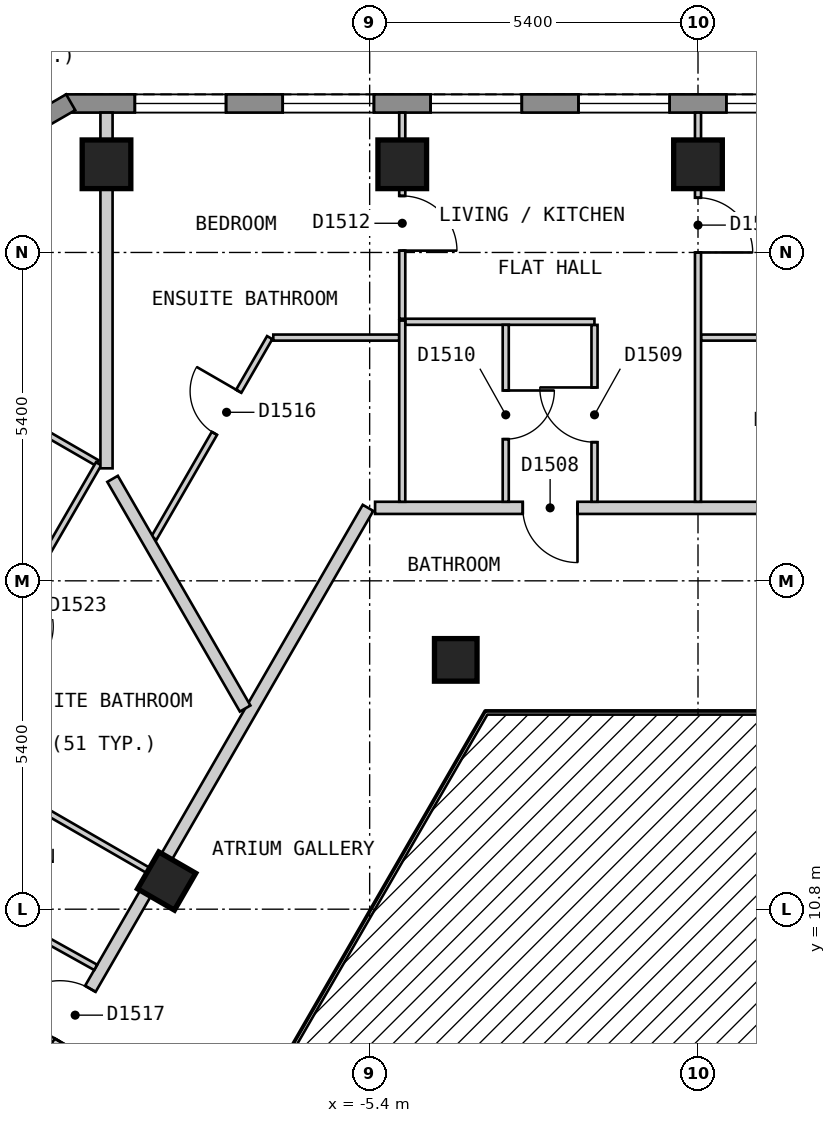
"""IFC4 building model, lengths in metres.
Left out: names, types, materials, properties, quantities, classifications, styles, units other than length and angle.
Written with IfcOpenShell. Run it as: python <this file> out.ifc"""

import sys

from ifc_helpers import new_model, si_unit, direction, frame, frame_2d, origin, origin_2d, place, context, subcontext, project, spatial, polyline, rectangle, outline, extrude, element, fill, save


model = new_model("IFC4")
c1 = context("Model", 3, precision=1e-05, world=origin(), true_north=direction((0.0, 1.0)))
c2 = subcontext(c1, "Body", "Model", "MODEL_VIEW")
j1 = project(units=[si_unit("LENGTHUNIT", "METRE"), si_unit("PLANEANGLEUNIT", "RADIAN")], contexts=[c1])
p1 = place(None, origin())
s1 = spatial("IfcSite", under=j1, at=p1, CompositionType="ELEMENT")
p2 = place(p1, origin())
s2 = spatial("IfcBuilding", under=s1, at=p2, CompositionType="ELEMENT")
p3 = place(p2, frame((0.0, 0.0, 190.2)))
s3 = spatial("IfcBuildingStorey", under=s2, at=p3, CompositionType="ELEMENT", Elevation=190.2)
for number, where, z_axis, x_axis in (
    (1, (0.0, 23.05, 0.0), (0.0, 0.0, 1.0), (-1.0, 0.0, 0.0)),
    (2, (-4.864, 23.05, 0.0), (0.0, 0.0, 1.0), (-1.0, 0.0, 0.0)),
    (3, (-9.728, 23.05, 0.0), (0.0, 0.0, 1.0), (-1.0, 0.0, 0.0)),
):
    element("IfcColumn", number, at=place(p3, frame(where, z_axis=z_axis, x_axis=x_axis)), inside=s3, PredefinedType="COLUMN", context=c2, shape_type="SweptSolid", body=[
        extrude(rectangle(XDim=0.8, YDim=0.8, at=origin_2d()), origin(), (0.0, 0.0, 1.0), 3.0),
    ])
for number, where, z_axis, x_axis in (
    (4, (-3.984, 14.9, 0.0), (0.0, 0.0, 1.0), (1.0, 0.0, 0.0)),
    (5, (-8.739, 11.263, 0.0), (0.0, 0.0, 1.0), (-0.5, -0.866, 0.0)),
):
    element("IfcColumn", number, at=place(p3, frame(where, z_axis=z_axis, x_axis=x_axis)), inside=s3, PredefinedType="COLUMN", context=c2, shape_type="SweptSolid", body=[
        extrude(rectangle(XDim=0.7, YDim=0.7, at=origin_2d()), origin(), (0.0, 0.0, 1.0), 3.0),
    ])
p4 = place(p3, frame((10.392, 24.05, 0.0), z_axis=(0.0, 0.0, 1.0), x_axis=(-1.0, 0.0, 0.0)))
e6 = element("IfcWall", 6, at=p4, inside=s3, PredefinedType="SOLIDWALL", context=c2, shape_type="SweptSolid", body=[
    extrude(outline(polyline([(0.0, -0.15), (20.784, -0.15), (20.704, 0.15), (0.08, 0.15), (0.0, -0.15)])), origin(), (0.0, 0.0, 1.0), 2.7),
])
p5 = place(p4, frame((1.13, 0.0, 0.15)))
e7 = element("IfcOpeningElement", 7, at=p5, cuts=e6, PredefinedType="OPENING", context=c2, shape_type="SweptSolid", body=[
    extrude(rectangle(XDim=1.5, YDim=2.1, at=frame_2d((0.75, 1.05))), frame((0.0, 0.16, 0.0), z_axis=(0.0, -1.0, 0.0), x_axis=(1.0, 0.0, 0.0)), (0.0, 0.0, 1.0), 0.32),
])
p6 = place(p4, frame((3.562, 0.0, 0.15)))
e8 = element("IfcOpeningElement", 8, at=p6, cuts=e6, PredefinedType="OPENING", context=c2, shape_type="SweptSolid", body=[
    extrude(rectangle(XDim=1.5, YDim=2.1, at=frame_2d((0.75, 1.05))), frame((0.0, 0.16, 0.0), z_axis=(0.0, -1.0, 0.0), x_axis=(1.0, 0.0, 0.0)), (0.0, 0.0, 1.0), 0.32),
])
p7 = place(p4, frame((5.994, 0.0, 0.15)))
e9 = element("IfcOpeningElement", 9, at=p7, cuts=e6, PredefinedType="OPENING", context=c2, shape_type="SweptSolid", body=[
    extrude(rectangle(XDim=1.5, YDim=2.1, at=frame_2d((0.75, 1.05))), frame((0.0, 0.16, 0.0), z_axis=(0.0, -1.0, 0.0), x_axis=(1.0, 0.0, 0.0)), (0.0, 0.0, 1.0), 0.32),
])
p8 = place(p4, frame((8.426, 0.0, 0.15)))
e10 = element("IfcOpeningElement", 10, at=p8, cuts=e6, PredefinedType="OPENING", context=c2, shape_type="SweptSolid", body=[
    extrude(rectangle(XDim=1.5, YDim=2.1, at=frame_2d((0.75, 1.05))), frame((0.0, 0.16, 0.0), z_axis=(0.0, -1.0, 0.0), x_axis=(1.0, 0.0, 0.0)), (0.0, 0.0, 1.0), 0.32),
])
p9 = place(p4, frame((10.858, 0.0, 0.15)))
e11 = element("IfcOpeningElement", 11, at=p9, cuts=e6, PredefinedType="OPENING", context=c2, shape_type="SweptSolid", body=[
    extrude(rectangle(XDim=1.5, YDim=2.1, at=frame_2d((0.75, 1.05))), frame((0.0, 0.16, 0.0), z_axis=(0.0, -1.0, 0.0), x_axis=(1.0, 0.0, 0.0)), (0.0, 0.0, 1.0), 0.32),
])
p10 = place(p4, frame((13.29, 0.0, 0.15)))
e12 = element("IfcOpeningElement", 12, at=p10, cuts=e6, PredefinedType="OPENING", context=c2, shape_type="SweptSolid", body=[
    extrude(rectangle(XDim=1.5, YDim=2.1, at=frame_2d((0.75, 1.05))), frame((0.0, 0.16, 0.0), z_axis=(0.0, -1.0, 0.0), x_axis=(1.0, 0.0, 0.0)), (0.0, 0.0, 1.0), 0.32),
])
p11 = place(p4, frame((15.722, 0.0, 0.15)))
e13 = element("IfcOpeningElement", 13, at=p11, cuts=e6, PredefinedType="OPENING", context=c2, shape_type="SweptSolid", body=[
    extrude(rectangle(XDim=1.5, YDim=2.1, at=frame_2d((0.75, 1.05))), frame((0.0, 0.16, 0.0), z_axis=(0.0, -1.0, 0.0), x_axis=(1.0, 0.0, 0.0)), (0.0, 0.0, 1.0), 0.32),
])
p12 = place(p4, frame((18.154, 0.0, 0.15)))
e14 = element("IfcOpeningElement", 14, at=p12, cuts=e6, PredefinedType="OPENING", context=c2, shape_type="SweptSolid", body=[
    extrude(rectangle(XDim=1.5, YDim=2.1, at=frame_2d((0.75, 1.05))), frame((0.0, 0.16, 0.0), z_axis=(0.0, -1.0, 0.0), x_axis=(1.0, 0.0, 0.0)), (0.0, 0.0, 1.0), 0.32),
])
p13 = place(p3, frame((-10.317, 24.07, 0.0), z_axis=(0.0, 0.0, 1.0), x_axis=(-0.866022959057, -0.500004234368, 0.0)))
e15 = element("IfcWall", 15, at=p13, inside=s3, PredefinedType="SOLIDWALL", context=c2, shape_type="SweptSolid", body=[
    extrude(outline(polyline([(0.0, -0.15), (5.0, -0.15), (4.92, 0.15), (0.08, 0.15), (0.0, -0.15)])), origin(), (0.0, 0.0, 1.0), 2.7),
])
p14 = place(p13, frame((0.65, 0.0, 0.15)))
e16 = element("IfcOpeningElement", 16, at=p14, cuts=e15, PredefinedType="OPENING", context=c2, shape_type="SweptSolid", body=[
    extrude(rectangle(XDim=1.2, YDim=2.1, at=frame_2d((0.6, 1.05))), frame((0.0, 0.16, 0.0), z_axis=(0.0, -1.0, 0.0), x_axis=(1.0, 0.0, 0.0)), (0.0, 0.0, 1.0), 0.32),
])
p15 = place(p13, frame((3.149, 0.0, 0.15)))
e17 = element("IfcOpeningElement", 17, at=p15, cuts=e15, PredefinedType="OPENING", context=c2, shape_type="SweptSolid", body=[
    extrude(rectangle(XDim=1.2, YDim=2.1, at=frame_2d((0.6, 1.05))), frame((0.0, 0.16, 0.0), z_axis=(0.0, -1.0, 0.0), x_axis=(1.0, 0.0, 0.0)), (0.0, 0.0, 1.0), 0.32),
])
p16 = place(p3, frame((-5.311, 17.4, 0.0), z_axis=(0.0, 0.0, 1.0), x_axis=(1.0, 0.0, 0.0)))
e18 = element("IfcWall", 18, at=p16, inside=s3, PredefinedType="PARTITIONING", context=c2, shape_type="SweptSolid", body=[
    extrude(rectangle(XDim=10.737, YDim=0.2, at=frame_2d((5.369, 0.0))), origin(), (0.0, 0.0, 1.0), 2.7),
])
p17 = place(p16, frame((2.429, 0.0, 0.0)))
e19 = element("IfcOpeningElement", 19, at=p17, cuts=e18, PredefinedType="OPENING", context=c2, shape_type="SweptSolid", body=[
    extrude(rectangle(XDim=0.9, YDim=2.1, at=frame_2d((0.45, 1.05))), frame((0.0, 0.11, 0.0), z_axis=(0.0, -1.0, 0.0), x_axis=(1.0, 0.0, 0.0)), (0.0, 0.0, 1.0), 0.22),
])
p18 = place(p3, frame((-10.854, 8.0, 0.0), z_axis=(0.0, 0.0, 1.0), x_axis=(0.499997637144, 0.866026767976, 0.0)))
e20 = element("IfcWall", 20, at=p18, inside=s3, PredefinedType="PARTITIONING", context=c2, shape_type="SweptSolid", body=[
    extrude(rectangle(XDim=10.854, YDim=0.2, at=frame_2d((5.427, 0.0))), origin(), (0.0, 0.0, 1.0), 2.7),
])
p19 = place(p18, frame((0.721, 0.0, 0.0)))
e21 = element("IfcOpeningElement", 21, at=p19, cuts=e20, PredefinedType="OPENING", context=c2, shape_type="SweptSolid", body=[
    extrude(rectangle(XDim=1.0, YDim=2.1, at=frame_2d((0.5, 1.05))), frame((0.0, 0.11, 0.0), z_axis=(0.0, -1.0, 0.0), x_axis=(1.0, 0.0, 0.0)), (0.0, 0.0, 1.0), 0.22),
])
p20 = place(p3, frame((-4.864, 23.9, 0.0), z_axis=(0.0, 0.0, 1.0), x_axis=(0.0, -1.0, 0.0)))
e22 = element("IfcWall", 22, at=p20, inside=s3, PredefinedType="PARTITIONING", context=c2, shape_type="SweptSolid", body=[
    extrude(rectangle(XDim=3.39, YDim=0.1, at=frame_2d((1.695, 0.0))), origin(), (0.0, 0.0, 1.0), 2.7),
])
p21 = place(p20, frame((1.37, 0.0, 0.0)))
e23 = element("IfcOpeningElement", 23, at=p21, cuts=e22, PredefinedType="OPENING", context=c2, shape_type="SweptSolid", body=[
    extrude(rectangle(XDim=0.9, YDim=2.1, at=frame_2d((0.45, 1.05))), frame((0.0, 0.06, 0.0), z_axis=(0.0, -1.0, 0.0), x_axis=(1.0, 0.0, 0.0)), (0.0, 0.0, 1.0), 0.12),
])
p22 = place(p3, frame((-1.702, 20.409, 0.0), z_axis=(0.0, 0.0, 1.0), x_axis=(0.0, -1.0, 0.0)))
e24 = element("IfcWall", 24, at=p22, inside=s3, PredefinedType="PARTITIONING", context=c2, shape_type="SweptSolid", body=[
    extrude(rectangle(XDim=2.909, YDim=0.1, at=frame_2d((1.455, 0.0))), origin(), (0.0, 0.0, 1.0), 2.7),
])
p23 = place(p22, frame((1.029, 0.0, 0.0)))
e25 = element("IfcOpeningElement", 25, at=p23, cuts=e24, PredefinedType="OPENING", context=c2, shape_type="SweptSolid", body=[
    extrude(rectangle(XDim=0.9, YDim=2.1, at=frame_2d((0.45, 1.05))), frame((0.0, 0.06, 0.0), z_axis=(0.0, -1.0, 0.0), x_axis=(1.0, 0.0, 0.0)), (0.0, 0.0, 1.0), 0.12),
])
p24 = place(p3, frame((-13.444, 11.814, 0.0), z_axis=(0.0, 0.0, 1.0), x_axis=(0.873653620945, -0.486548405207, 0.0)))
e26 = element("IfcWall", 26, at=p24, inside=s3, PredefinedType="PARTITIONING", context=c2, shape_type="SweptSolid", body=[
    extrude(rectangle(XDim=4.051, YDim=0.1, at=frame_2d((2.025, 0.0))), origin(), (0.0, 0.0, 1.0), 2.7),
])
p25 = place(p24, frame((1.6, 0.0, 0.0)))
e27 = element("IfcOpeningElement", 27, at=p25, cuts=e26, PredefinedType="OPENING", context=c2, shape_type="SweptSolid", body=[
    extrude(rectangle(XDim=0.9, YDim=2.1, at=frame_2d((0.45, 1.05))), frame((0.0, 0.06, 0.0), z_axis=(0.0, -1.0, 0.0), x_axis=(1.0, 0.0, 0.0)), (0.0, 0.0, 1.0), 0.12),
])
p26 = place(p3, frame((-14.794, 20.975, 0.0), z_axis=(0.0, 0.0, 1.0), x_axis=(0.865989811779, -0.500061642096, 0.0)))
e28 = element("IfcWall", 28, at=p26, inside=s3, PredefinedType="PARTITIONING", context=c2, shape_type="SweptSolid", body=[
    extrude(rectangle(XDim=5.67, YDim=0.1, at=frame_2d((2.835, 0.0))), origin(), (0.0, 0.0, 1.0), 2.7),
])
p27 = place(p26, frame((2.41, 0.0, 0.0)))
e29 = element("IfcOpeningElement", 29, at=p27, cuts=e28, PredefinedType="OPENING", context=c2, shape_type="SweptSolid", body=[
    extrude(rectangle(XDim=0.9, YDim=2.1, at=frame_2d((0.45, 1.05))), frame((0.0, 0.06, 0.0), z_axis=(0.0, -1.0, 0.0), x_axis=(1.0, 0.0, 0.0)), (0.0, 0.0, 1.0), 0.12),
])
p28 = place(p3, frame((-6.985, 20.2, 0.0), z_axis=(0.0, 0.0, 1.0), x_axis=(1.0, 0.0, 0.0)))
e30 = element("IfcWall", 30, at=p28, inside=s3, PredefinedType="PARTITIONING", context=c2, shape_type="SweptSolid", body=[
    extrude(rectangle(XDim=2.071, YDim=0.1, at=frame_2d((1.036, 0.0))), origin(), (0.0, 0.0, 1.0), 2.7),
])
p29 = place(p3, frame((0.05, 20.2, 0.0), z_axis=(0.0, 0.0, 1.0), x_axis=(1.0, 0.0, 0.0)))
e31 = element("IfcWall", 31, at=p29, inside=s3, PredefinedType="PARTITIONING", context=c2, shape_type="SweptSolid", body=[
    extrude(rectangle(XDim=6.993, YDim=0.1, at=frame_2d((3.497, 0.0))), origin(), (0.0, 0.0, 1.0), 2.7),
])
p30 = place(p29, frame((1.982, 0.0, 0.0)))
e32 = element("IfcOpeningElement", 32, at=p30, cuts=e31, PredefinedType="OPENING", context=c2, shape_type="SweptSolid", body=[
    extrude(rectangle(XDim=0.8, YDim=2.1, at=frame_2d((0.4, 1.05))), frame((0.0, 0.06, 0.0), z_axis=(0.0, -1.0, 0.0), x_axis=(1.0, 0.0, 0.0)), (0.0, 0.0, 1.0), 0.12),
])
p31 = place(p3, frame((-4.814, 20.46, 0.0), z_axis=(0.0, 0.0, 1.0), x_axis=(1.0, 0.0, 0.0)))
e33 = element("IfcWall", 33, at=p31, inside=s3, PredefinedType="PARTITIONING", context=c2, shape_type="SweptSolid", body=[
    extrude(rectangle(XDim=3.111, YDim=0.1, at=frame_2d((1.556, 0.0))), origin(), (0.0, 0.0, 1.0), 2.7),
])
p32 = place(p3, frame((-8.949, 16.9, 0.0), z_axis=(0.0, 0.0, 1.0), x_axis=(0.499949850951, 0.866054355415, 0.0)))
e34 = element("IfcWall", 34, at=p32, inside=s3, PredefinedType="PARTITIONING", context=c2, shape_type="SweptSolid", body=[
    extrude(rectangle(XDim=3.811, YDim=0.1, at=frame_2d((1.905, 0.0))), origin(), (0.0, 0.0, 1.0), 2.7),
])
p33 = place(p32, frame((1.992, 0.0, 0.0)))
e35 = element("IfcOpeningElement", 35, at=p33, cuts=e34, PredefinedType="OPENING", context=c2, shape_type="SweptSolid", body=[
    extrude(rectangle(XDim=0.8, YDim=2.1, at=frame_2d((0.4, 1.05))), frame((0.0, 0.06, 0.0), z_axis=(0.0, -1.0, 0.0), x_axis=(1.0, 0.0, 0.0)), (0.0, 0.0, 1.0), 0.12),
])
p34 = place(p3, frame((-15.192, 8.887, 0.0), z_axis=(0.0, 0.0, 1.0), x_axis=(0.500028204665, 0.866009119201, 0.0)))
e36 = element("IfcWall", 36, at=p34, inside=s3, PredefinedType="PARTITIONING", context=c2, shape_type="SweptSolid", body=[
    extrude(rectangle(XDim=10.667, YDim=0.1, at=frame_2d((5.334, 0.0))), origin(), (0.0, 0.0, 1.0), 2.7),
])
p35 = place(p34, frame((2.108, 0.0, 0.0)))
e37 = element("IfcOpeningElement", 37, at=p35, cuts=e36, PredefinedType="OPENING", context=c2, shape_type="SweptSolid", body=[
    extrude(rectangle(XDim=0.9, YDim=2.1, at=frame_2d((0.45, 1.05))), frame((0.0, 0.06, 0.0), z_axis=(0.0, -1.0, 0.0), x_axis=(1.0, 0.0, 0.0)), (0.0, 0.0, 1.0), 0.12),
])
p36 = place(p34, frame((7.576, 0.0, 0.0)))
e38 = element("IfcOpeningElement", 38, at=p36, cuts=e36, PredefinedType="OPENING", context=c2, shape_type="SweptSolid", body=[
    extrude(rectangle(XDim=0.8, YDim=2.1, at=frame_2d((0.4, 1.05))), frame((0.0, 0.06, 0.0), z_axis=(0.0, -1.0, 0.0), x_axis=(1.0, 0.0, 0.0)), (0.0, 0.0, 1.0), 0.12),
])
p37 = place(p3, frame((0.0, 17.5, 0.0), z_axis=(0.0, 0.0, 1.0), x_axis=(0.0, 1.0, 0.0)))
e39 = element("IfcWall", 39, at=p37, inside=s3, PredefinedType="PARTITIONING", context=c2, shape_type="SweptSolid", body=[
    extrude(rectangle(XDim=6.4, YDim=0.1, at=frame_2d((3.2, 0.0))), origin(), (0.0, 0.0, 1.0), 2.7),
])
p38 = place(p37, frame((4.1, 0.0, 0.0)))
e40 = element("IfcOpeningElement", 40, at=p38, cuts=e39, PredefinedType="OPENING", context=c2, shape_type="SweptSolid", body=[
    extrude(rectangle(XDim=0.9, YDim=2.1, at=frame_2d((0.45, 1.05))), frame((0.0, 0.06, 0.0), z_axis=(0.0, -1.0, 0.0), x_axis=(1.0, 0.0, 0.0)), (0.0, 0.0, 1.0), 0.12),
])
p39 = place(p3, frame((-3.162, 17.5, 0.0), z_axis=(0.0, 0.0, 1.0), x_axis=(0.0, 1.0, 0.0)))
e41 = element("IfcWall", 41, at=p39, inside=s3, PredefinedType="PARTITIONING", context=c2, shape_type="SweptSolid", body=[
    extrude(rectangle(XDim=2.91, YDim=0.1, at=frame_2d((1.455, 0.0))), origin(), (0.0, 0.0, 1.0), 2.7),
])
p40 = place(p39, frame((1.03, 0.0, 0.0)))
e42 = element("IfcOpeningElement", 42, at=p40, cuts=e41, PredefinedType="OPENING", context=c2, shape_type="SweptSolid", body=[
    extrude(rectangle(XDim=0.8, YDim=2.1, at=frame_2d((0.4, 1.05))), frame((0.0, 0.06, 0.0), z_axis=(0.0, -1.0, 0.0), x_axis=(1.0, 0.0, 0.0)), (0.0, 0.0, 1.0), 0.12),
])
p41 = place(p3, frame((-4.864, 17.5, 0.0), z_axis=(0.0, 0.0, 1.0), x_axis=(0.0, 1.0, 0.0)))
e43 = element("IfcWall", 43, at=p41, inside=s3, PredefinedType="PARTITIONING", context=c2, shape_type="SweptSolid", body=[
    extrude(rectangle(XDim=2.98, YDim=0.1, at=frame_2d((1.49, 0.0))), origin(), (0.0, 0.0, 1.0), 2.7),
])
p42 = place(p3, frame((-9.628, 17.877, 0.0), z_axis=(0.0, 0.0, 1.0), x_axis=(0.499890461358, -0.866088636713, 0.0)))
e44 = element("IfcWall", 44, at=p42, inside=s3, PredefinedType="PARTITIONING", context=c2, shape_type="SweptSolid", body=[
    extrude(rectangle(XDim=4.361, YDim=0.2, at=frame_2d((2.18, 0.0))), origin(), (0.0, 0.0, 1.0), 2.7),
])
p43 = place(p3, frame((-9.728, 18.05, 0.0), z_axis=(0.0, 0.0, 1.0), x_axis=(0.0, 1.0, 0.0)))
e45 = element("IfcWall", 45, at=p43, inside=s3, PredefinedType="PARTITIONING", context=c2, shape_type="SweptSolid", body=[
    extrude(rectangle(XDim=5.85, YDim=0.2, at=frame_2d((2.925, 0.0))), origin(), (0.0, 0.0, 1.0), 2.7),
])
p44 = place(p3, frame((-12.55, 13.463, 0.0), z_axis=(0.0, 0.0, 1.0), x_axis=(0.86606561423, -0.499930346997, 0.0)))
e46 = element("IfcWall", 46, at=p44, inside=s3, PredefinedType="PARTITIONING", context=c2, shape_type="SweptSolid", body=[
    extrude(rectangle(XDim=4.1, YDim=0.1, at=frame_2d((2.05, 0.0))), origin(), (0.0, 0.0, 1.0), 2.7),
])
p45 = place(p8, origin())
e47 = element("IfcWindow", 47, at=p45, inside=s3, PartitioningType="SINGLE_PANEL", PredefinedType="WINDOW", context=c2, shape_type="SweptSolid", body=[
    extrude(rectangle(XDim=1.5, YDim=2.1, at=frame_2d((0.75, 1.05))), frame((0.0, 0.03, 0.0), z_axis=(0.0, -1.0, 0.0), x_axis=(1.0, 0.0, 0.0)), (0.0, 0.0, 1.0), 0.06),
])
fill(e10, e47)
p46 = place(p9, origin())
e48 = element("IfcWindow", 48, at=p46, inside=s3, PartitioningType="SINGLE_PANEL", PredefinedType="WINDOW", context=c2, shape_type="SweptSolid", body=[
    extrude(rectangle(XDim=1.5, YDim=2.1, at=frame_2d((0.75, 1.05))), frame((0.0, 0.03, 0.0), z_axis=(0.0, -1.0, 0.0), x_axis=(1.0, 0.0, 0.0)), (0.0, 0.0, 1.0), 0.06),
])
fill(e11, e48)
p47 = place(p10, origin())
e49 = element("IfcWindow", 49, at=p47, inside=s3, PartitioningType="SINGLE_PANEL", PredefinedType="WINDOW", context=c2, shape_type="SweptSolid", body=[
    extrude(rectangle(XDim=1.5, YDim=2.1, at=frame_2d((0.75, 1.05))), frame((0.0, 0.03, 0.0), z_axis=(0.0, -1.0, 0.0), x_axis=(1.0, 0.0, 0.0)), (0.0, 0.0, 1.0), 0.06),
])
fill(e12, e49)
p48 = place(p11, origin())
e50 = element("IfcWindow", 50, at=p48, inside=s3, PartitioningType="SINGLE_PANEL", PredefinedType="WINDOW", context=c2, shape_type="SweptSolid", body=[
    extrude(rectangle(XDim=1.5, YDim=2.1, at=frame_2d((0.75, 1.05))), frame((0.0, 0.03, 0.0), z_axis=(0.0, -1.0, 0.0), x_axis=(1.0, 0.0, 0.0)), (0.0, 0.0, 1.0), 0.06),
])
fill(e13, e50)
p49 = place(p12, origin())
e51 = element("IfcWindow", 51, at=p49, inside=s3, PartitioningType="SINGLE_PANEL", PredefinedType="WINDOW", context=c2, shape_type="SweptSolid", body=[
    extrude(rectangle(XDim=1.5, YDim=2.1, at=frame_2d((0.75, 1.05))), frame((0.0, 0.03, 0.0), z_axis=(0.0, -1.0, 0.0), x_axis=(1.0, 0.0, 0.0)), (0.0, 0.0, 1.0), 0.06),
])
fill(e14, e51)
p50 = place(p17, origin())
e52 = element("IfcDoor", 52, at=p50, inside=s3, OperationType="SINGLE_SWING_RIGHT", PredefinedType="DOOR", context=c2, shape_type="SweptSolid", body=[
    extrude(rectangle(XDim=0.9, YDim=2.1, at=frame_2d((0.45, 1.05))), frame((0.0, 0.025, 0.0), z_axis=(0.0, -1.0, 0.0), x_axis=(1.0, 0.0, 0.0)), (0.0, 0.0, 1.0), 0.05),
])
fill(e19, e52)
p51 = place(p23, origin())
e53 = element("IfcDoor", 53, at=p51, inside=s3, OperationType="SINGLE_SWING_LEFT", PredefinedType="DOOR", context=c2, shape_type="SweptSolid", body=[
    extrude(rectangle(XDim=0.9, YDim=2.1, at=frame_2d((0.45, 1.05))), frame((0.0, 0.025, 0.0), z_axis=(0.0, -1.0, 0.0), x_axis=(1.0, 0.0, 0.0)), (0.0, 0.0, 1.0), 0.05),
])
fill(e25, e53)
p52 = place(p40, origin())
e54 = element("IfcDoor", 54, at=p52, inside=s3, OperationType="SINGLE_SWING_RIGHT", PredefinedType="DOOR", context=c2, shape_type="SweptSolid", body=[
    extrude(rectangle(XDim=0.8, YDim=2.1, at=frame_2d((0.4, 1.05))), frame((0.0, 0.025, 0.0), z_axis=(0.0, -1.0, 0.0), x_axis=(1.0, 0.0, 0.0)), (0.0, 0.0, 1.0), 0.05),
])
fill(e42, e54)
p53 = place(p38, origin())
e55 = element("IfcDoor", 55, at=p53, inside=s3, OperationType="SINGLE_SWING_LEFT", PredefinedType="DOOR", context=c2, shape_type="SweptSolid", body=[
    extrude(rectangle(XDim=0.9, YDim=2.1, at=frame_2d((0.45, 1.05))), frame((0.0, 0.025, 0.0), z_axis=(0.0, -1.0, 0.0), x_axis=(1.0, 0.0, 0.0)), (0.0, 0.0, 1.0), 0.05),
])
fill(e40, e55)
p54 = place(p21, origin())
e56 = element("IfcDoor", 56, at=p54, inside=s3, OperationType="SINGLE_SWING_RIGHT", PredefinedType="DOOR", context=c2, shape_type="SweptSolid", body=[
    extrude(rectangle(XDim=0.9, YDim=2.1, at=frame_2d((0.45, 1.05))), frame((0.0, 0.025, 0.0), z_axis=(0.0, -1.0, 0.0), x_axis=(1.0, 0.0, 0.0)), (0.0, 0.0, 1.0), 0.05),
])
fill(e23, e56)
p55 = place(p33, origin())
e57 = element("IfcDoor", 57, at=p55, inside=s3, OperationType="SINGLE_SWING_RIGHT", PredefinedType="DOOR", context=c2, shape_type="SweptSolid", body=[
    extrude(rectangle(XDim=0.8, YDim=2.1, at=frame_2d((0.4, 1.05))), frame((0.0, 0.025, 0.0), z_axis=(0.0, -1.0, 0.0), x_axis=(1.0, 0.0, 0.0)), (0.0, 0.0, 1.0), 0.05),
])
fill(e35, e57)
p56 = place(p19, origin())
e58 = element("IfcDoor", 58, at=p56, inside=s3, OperationType="SINGLE_SWING_LEFT", PredefinedType="DOOR", context=c2, shape_type="SweptSolid", body=[
    extrude(rectangle(XDim=1.0, YDim=2.1, at=frame_2d((0.5, 1.05))), frame((0.0, 0.025, 0.0), z_axis=(0.0, -1.0, 0.0), x_axis=(1.0, 0.0, 0.0)), (0.0, 0.0, 1.0), 0.05),
])
fill(e21, e58)
save(model, sys.argv[1])
